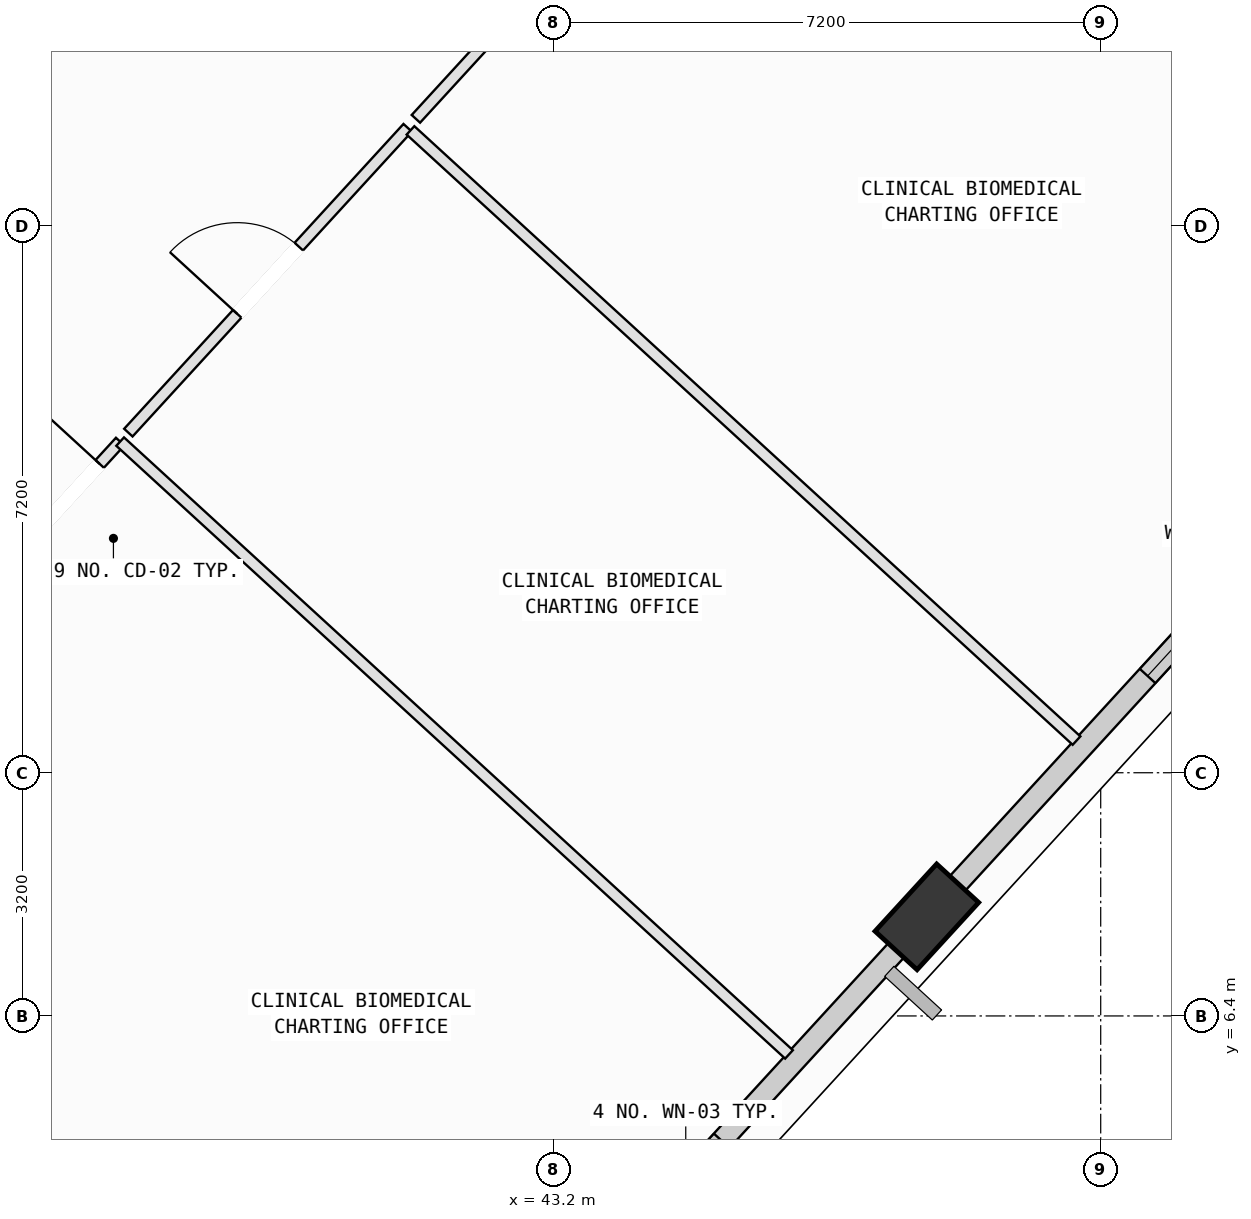
"""IFC4 building model, lengths in metres.
Left out: names, types, materials, properties, quantities, classifications, styles, units other than length and angle.
Written with IfcOpenShell. Run it as: python <this file> out.ifc"""

import sys

from ifc_helpers import new_model, si_unit, direction, frame, frame_2d, origin, origin_2d, place, context, subcontext, project, spatial, rectangle, extrude, element, fill, save


model = new_model("IFC4")
c1 = context("Model", 3, precision=1e-05, world=origin(), true_north=direction((0.0, 1.0)))
c2 = subcontext(c1, "Body", "Model", "MODEL_VIEW")
j1 = project(units=[si_unit("LENGTHUNIT", "METRE"), si_unit("PLANEANGLEUNIT", "RADIAN")], contexts=[c1])
p1 = place(None, origin())
s1 = spatial("IfcSite", under=j1, at=p1, CompositionType="ELEMENT")
p2 = place(p1, origin())
s2 = spatial("IfcBuilding", under=s1, at=p2, CompositionType="ELEMENT")
p3 = place(p2, frame((0.0, 0.0, 227.2)))
s3 = spatial("IfcBuildingStorey", under=s2, at=p3, CompositionType="ELEMENT", Elevation=227.2)
p4 = place(p3, frame((48.113, 7.704, 0.002), z_axis=(0.070074846403, 0.060463886566, 0.995707604833), x_axis=(-0.997158195754, 0.031922497076, 0.068238455582)))
e1 = element("IfcColumn", 1, at=p4, inside=s3, PredefinedType="COLUMN", context=c2, shape_type="SweptSolid", body=[
    extrude(rectangle(XDim=1.2, YDim=0.75, at=origin_2d()), origin(), (0.0, 0.0, 1.0), 4.014),
])
p5 = place(p3, frame((47.969, 7.547, 0.0), z_axis=(0.0, 0.0, 1.0), x_axis=(-0.67557981621, -0.737286858644, 0.0)))
e2 = element("IfcWall", 2, at=p5, inside=s3, PredefinedType="SOLIDWALL", context=c2, shape_type="SweptSolid", body=[
    extrude(rectangle(XDim=6.413, YDim=0.28, at=frame_2d((3.207, 0.0))), origin(), (0.0, 0.0, 1.0), 3.265),
])
p6 = place(p5, frame((3.783, 0.0, 0.75)))
e3 = element("IfcOpeningElement", 3, at=p6, cuts=e2, PredefinedType="OPENING", context=c2, shape_type="SweptSolid", body=[
    extrude(rectangle(XDim=1.4, YDim=1.85, at=frame_2d((0.7, 0.925))), frame((0.0, 0.15, 0.0), z_axis=(0.0, -1.0, 0.0), x_axis=(1.0, 0.0, 0.0)), (0.0, 0.0, 1.0), 0.3),
])
p7 = place(p3, frame((52.834, 12.856, 0.0), z_axis=(0.0, 0.0, 1.0), x_axis=(-0.675586571209, -0.737280668946, 0.0)))
e4 = element("IfcWall", 4, at=p7, inside=s3, PredefinedType="SOLIDWALL", context=c2, shape_type="SweptSolid", body=[
    extrude(rectangle(XDim=6.407, YDim=0.28, at=frame_2d((3.203, 0.0))), origin(), (0.0, 0.0, 1.0), 3.265),
])
p8 = place(p7, frame((0.89, 0.0, 0.75)))
e5 = element("IfcOpeningElement", 5, at=p8, cuts=e4, PredefinedType="OPENING", context=c2, shape_type="SweptSolid", body=[
    extrude(rectangle(XDim=1.8, YDim=2.05, at=frame_2d((0.9, 1.025))), frame((0.0, 0.15, 0.0), z_axis=(0.0, -1.0, 0.0), x_axis=(1.0, 0.0, 0.0)), (0.0, 0.0, 1.0), 0.3),
])
p9 = place(p3, frame((31.921, 7.675, 0.0), z_axis=(0.0, 0.0, 1.0), x_axis=(0.737312092313, -0.675552276681, 0.0)))
e6 = element("IfcWall", 6, at=p9, inside=s3, PredefinedType="PARTITIONING", context=c2, shape_type="SweptSolid", body=[
    extrude(rectangle(XDim=11.804, YDim=0.15, at=frame_2d((5.902, 0.0))), origin(), (0.0, 0.0, 1.0), 3.78),
])
p10 = place(p9, frame((5.706, 0.0, 0.0)))
e7 = element("IfcOpeningElement", 7, at=p10, cuts=e6, PredefinedType="OPENING", context=c2, shape_type="SweptSolid", body=[
    extrude(rectangle(XDim=0.86, YDim=2.06, at=frame_2d((0.43, 1.03))), frame((0.0, 0.085, 0.0), z_axis=(0.0, -1.0, 0.0), x_axis=(1.0, 0.0, 0.0)), (0.0, 0.0, 1.0), 0.17),
])
p11 = place(p3, frame((36.15, 12.485, 0.0), z_axis=(0.0, 0.0, 1.0), x_axis=(0.675685869047, 0.73718966784, 0.0)))
e8 = element("IfcWall", 8, at=p11, inside=s3, PredefinedType="PARTITIONING", context=c2, shape_type="SweptSolid", body=[
    extrude(rectangle(XDim=1.997, YDim=0.15, at=frame_2d((0.998, 0.0))), origin(), (0.0, 0.0, 1.0), 3.78),
])
p12 = place(p11, frame((0.398, 0.0, 0.0)))
e9 = element("IfcOpeningElement", 9, at=p12, cuts=e8, PredefinedType="OPENING", context=c2, shape_type="SweptSolid", body=[
    extrude(rectangle(XDim=1.2, YDim=2.15, at=frame_2d((0.6, 1.075))), frame((0.0, 0.085, 0.0), z_axis=(0.0, -1.0, 0.0), x_axis=(1.0, 0.0, 0.0)), (0.0, 0.0, 1.0), 0.17),
])
p13 = place(p3, frame((37.499, 13.957, 0.0), z_axis=(0.0, 0.0, 1.0), x_axis=(0.737309503426, -0.675555102237, 0.0)))
e10 = element("IfcWall", 10, at=p13, inside=s3, PredefinedType="PARTITIONING", context=c2, shape_type="SweptSolid", body=[
    extrude(rectangle(XDim=11.935, YDim=0.15, at=frame_2d((5.968, 0.0))), origin(), (0.0, 0.0, 1.0), 3.78),
])
p14 = place(p3, frame((37.607, 14.075, 0.0), z_axis=(0.0, 0.0, 1.0), x_axis=(0.67555593544, 0.737308740008, 0.0)))
e11 = element("IfcWall", 11, at=p14, inside=s3, PredefinedType="PARTITIONING", context=c2, shape_type="SweptSolid", body=[
    extrude(rectangle(XDim=5.44, YDim=0.15, at=frame_2d((2.72, 0.0))), origin(), (0.0, 0.0, 1.0), 3.78),
])
p15 = place(p14, frame((2.12, 0.0, 0.0)))
e12 = element("IfcOpeningElement", 12, at=p15, cuts=e11, PredefinedType="OPENING", context=c2, shape_type="SweptSolid", body=[
    extrude(rectangle(XDim=1.2, YDim=2.15, at=frame_2d((0.6, 1.075))), frame((0.0, 0.085, 0.0), z_axis=(0.0, -1.0, 0.0), x_axis=(1.0, 0.0, 0.0)), (0.0, 0.0, 1.0), 0.17),
])
p16 = place(p3, frame((41.319, 18.052, 0.0), z_axis=(0.0, 0.0, 1.0), x_axis=(0.73730675083, -0.675558106443, 0.0)))
e13 = element("IfcWall", 13, at=p16, inside=s3, PredefinedType="PARTITIONING", context=c2, shape_type="SweptSolid", body=[
    extrude(rectangle(XDim=11.885, YDim=0.15, at=frame_2d((5.942, 0.0))), origin(), (0.0, 0.0, 1.0), 3.78),
])
p17 = place(p3, frame((48.675, 7.977, 0.0), z_axis=(0.0, 0.0, 1.0), x_axis=(-0.675668895571, -0.737205224858, 0.0)))
e14 = element("IfcWall", 14, at=p17, inside=s3, PredefinedType="PARTITIONING", context=c2, shape_type="SweptSolid", body=[
    extrude(rectangle(XDim=0.793, YDim=0.15, at=frame_2d((0.397, 0.0))), origin(), (0.0, 0.0, 1.0), 3.265),
])
p18 = place(p3, frame((41.39, 18.204, 0.0), z_axis=(0.0, 0.0, 1.0), x_axis=(0.67562131305, 0.737248832724, 0.0)))
e15 = element("IfcWall", 15, at=p18, inside=s3, PredefinedType="PARTITIONING", context=c2, shape_type="SweptSolid", body=[
    extrude(rectangle(XDim=8.24, YDim=0.15, at=frame_2d((4.12, 0.0))), origin(), (0.0, 0.0, 1.0), 3.78),
])
p19 = place(p18, frame((3.52, 0.0, 0.0)))
e16 = element("IfcOpeningElement", 16, at=p19, cuts=e15, PredefinedType="OPENING", context=c2, shape_type="SweptSolid", body=[
    extrude(rectangle(XDim=1.2, YDim=2.15, at=frame_2d((0.6, 1.075))), frame((0.0, 0.085, 0.0), z_axis=(0.0, -1.0, 0.0), x_axis=(1.0, 0.0, 0.0)), (0.0, 0.0, 1.0), 0.17),
])
p20 = place(p3, frame((46.957, 24.279, 0.0), z_axis=(0.0, 0.0, 1.0), x_axis=(0.737309503426, -0.675555102237, 0.0)))
e17 = element("IfcWall", 17, at=p20, inside=s3, PredefinedType="PARTITIONING", context=c2, shape_type="SweptSolid", body=[
    extrude(rectangle(XDim=11.935, YDim=0.15, at=frame_2d((5.968, 0.0))), origin(), (0.0, 0.0, 1.0), 3.78),
])
p21 = place(p8, origin())
e18 = element("IfcWindow", 18, at=p21, inside=s3, PartitioningType="SINGLE_PANEL", PredefinedType="WINDOW", context=c2, shape_type="SweptSolid", body=[
    extrude(rectangle(XDim=1.8, YDim=2.05, at=frame_2d((0.9, 1.025))), frame((0.0, 0.03, 0.0), z_axis=(0.0, -1.0, 0.0), x_axis=(1.0, 0.0, 0.0)), (0.0, 0.0, 1.0), 0.06),
])
fill(e5, e18)
p22 = place(p12, origin())
e19 = element("IfcDoor", 19, at=p22, inside=s3, OperationType="SINGLE_SWING_RIGHT", PredefinedType="DOOR", context=c2, shape_type="SweptSolid", body=[
    extrude(rectangle(XDim=1.2, YDim=2.15, at=frame_2d((0.6, 1.075))), frame((0.0, 0.025, 0.0), z_axis=(0.0, -1.0, 0.0), x_axis=(1.0, 0.0, 0.0)), (0.0, 0.0, 1.0), 0.05),
])
fill(e9, e19)
p23 = place(p15, origin())
e20 = element("IfcDoor", 20, at=p23, inside=s3, OperationType="SINGLE_SWING_LEFT", PredefinedType="DOOR", context=c2, shape_type="SweptSolid", body=[
    extrude(rectangle(XDim=1.2, YDim=2.15, at=frame_2d((0.6, 1.075))), frame((0.0, 0.025, 0.0), z_axis=(0.0, -1.0, 0.0), x_axis=(1.0, 0.0, 0.0)), (0.0, 0.0, 1.0), 0.05),
])
fill(e12, e20)
save(model, sys.argv[1])
